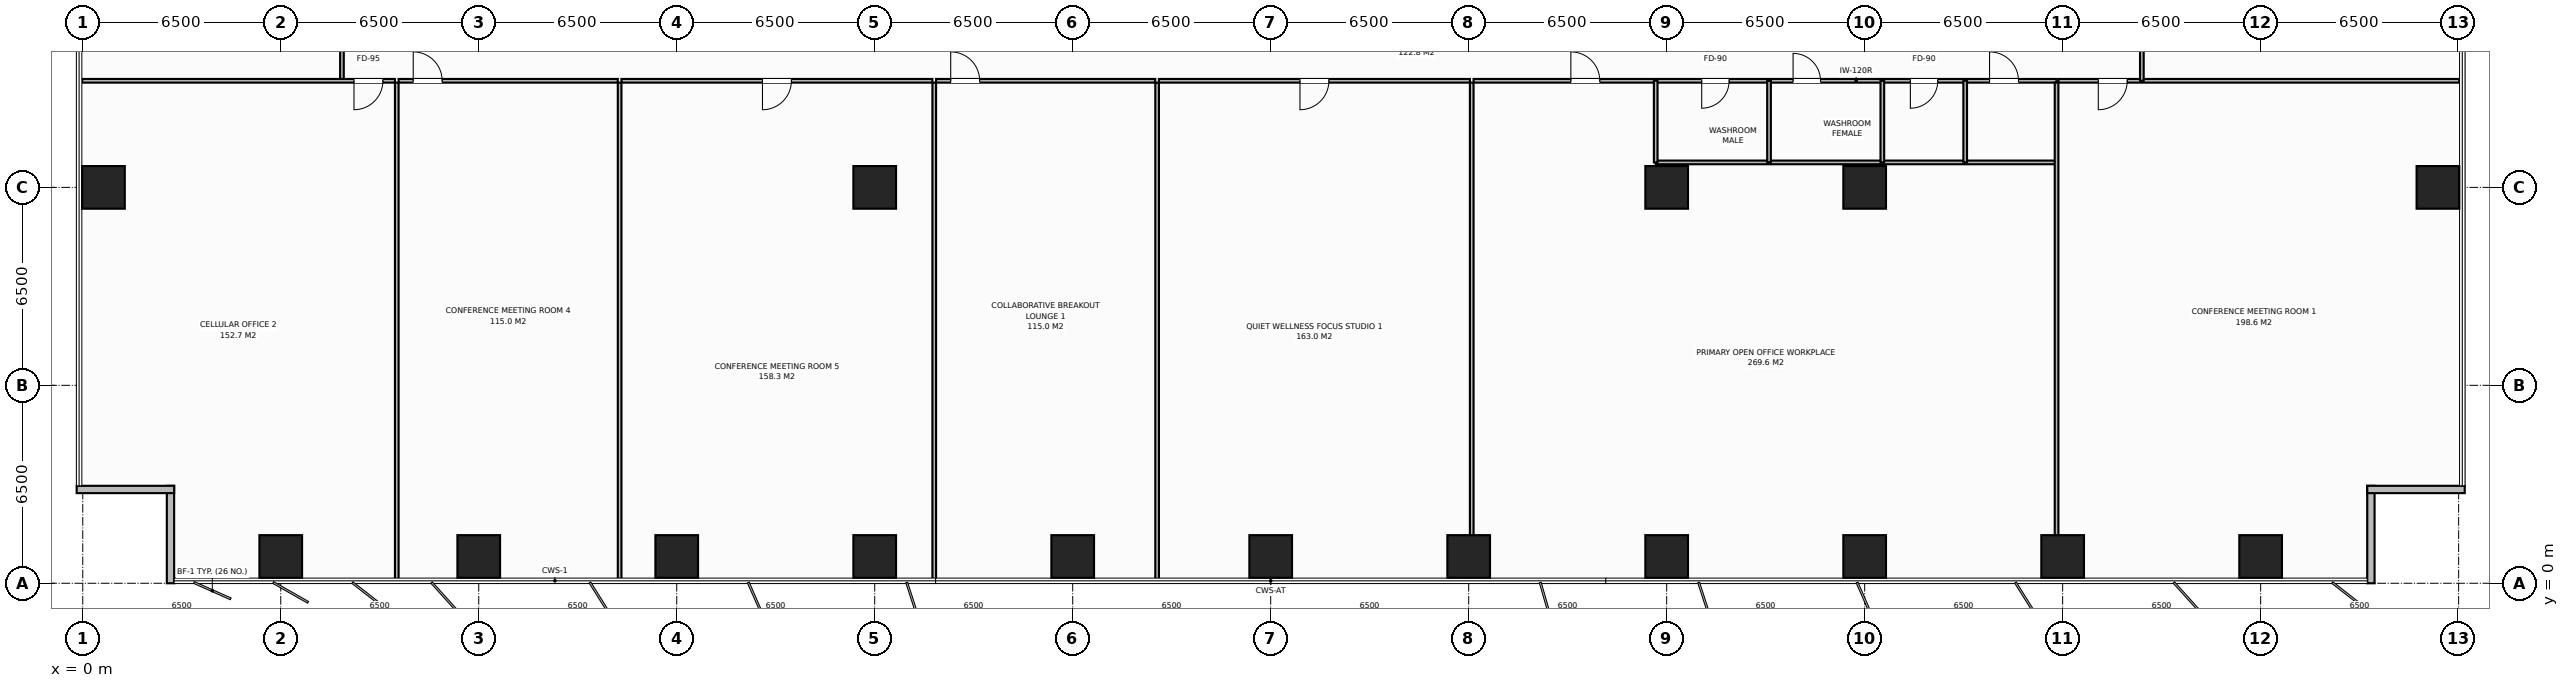
"""IFC4 building model, lengths in metres.
Left out: names, types, materials, properties, quantities, classifications, styles, units other than length and angle.
Written with IfcOpenShell. Run it as: python <this file> out.ifc"""

import sys

from ifc_helpers import new_model, si_unit, direction, frame, frame_2d, origin, origin_2d, place, context, subcontext, project, spatial, rectangle, extrude, element, fill, save


model = new_model("IFC4")
c1 = context("Model", 3, precision=1e-05, world=origin(), true_north=direction((0.0, 1.0)))
c2 = subcontext(c1, "Body", "Model", "MODEL_VIEW")
j1 = project(units=[si_unit("LENGTHUNIT", "METRE"), si_unit("PLANEANGLEUNIT", "RADIAN")], contexts=[c1])
p1 = place(None, origin())
s1 = spatial("IfcSite", under=j1, at=p1, CompositionType="ELEMENT")
p2 = place(p1, origin())
s2 = spatial("IfcBuilding", under=s1, at=p2, CompositionType="ELEMENT")
p3 = place(p2, frame((0.0, 0.0, 62.0)))
s3 = spatial("IfcBuildingStorey", under=s2, at=p3, CompositionType="ELEMENT", Elevation=62.0)
for number, where, z_axis, x_axis in (
    (1, (58.5, 13.0, 0.0), (0.0, 0.0, 1.0), (1.0, 0.0, 0.0)),
    (2, (26.0, 13.0, 0.0), (0.0, 0.0, 1.0), (1.0, 0.0, 0.0)),
    (3, (52.0, 13.0, 0.0), (0.0, 0.0, 1.0), (1.0, 0.0, 0.0)),
    (4, (6.5, 0.88, 0.0), (0.0, 0.0, 1.0), (1.0, 0.0, 0.0)),
    (5, (13.0, 0.88, 0.0), (0.0, 0.0, 1.0), (1.0, 0.0, 0.0)),
    (6, (19.5, 0.88, 0.0), (0.0, 0.0, 1.0), (1.0, 0.0, 0.0)),
    (7, (26.0, 0.88, 0.0), (0.0, 0.0, 1.0), (1.0, 0.0, 0.0)),
    (8, (32.5, 0.88, 0.0), (0.0, 0.0, 1.0), (1.0, 0.0, 0.0)),
    (9, (39.0, 0.88, 0.0), (0.0, 0.0, 1.0), (1.0, 0.0, 0.0)),
    (10, (45.5, 0.88, 0.0), (0.0, 0.0, 1.0), (1.0, 0.0, 0.0)),
    (11, (52.0, 0.88, 0.0), (0.0, 0.0, 1.0), (1.0, 0.0, 0.0)),
    (12, (58.5, 0.88, 0.0), (0.0, 0.0, 1.0), (1.0, 0.0, 0.0)),
    (13, (65.0, 0.88, 0.0), (0.0, 0.0, 1.0), (1.0, 0.0, 0.0)),
    (14, (71.5, 0.88, 0.0), (0.0, 0.0, 1.0), (1.0, 0.0, 0.0)),
    (15, (0.68, 13.0, 0.0), (0.0, 0.0, 1.0), (1.0, 0.0, 0.0)),
    (16, (77.32, 13.0, 0.0), (0.0, 0.0, 1.0), (1.0, 0.0, 0.0)),
):
    element("IfcColumn", number, at=place(p3, frame(where, z_axis=z_axis, x_axis=x_axis)), inside=s3, PredefinedType="COLUMN", context=c2, shape_type="SweptSolid", body=[
        extrude(rectangle(XDim=1.4, YDim=1.4, at=origin_2d()), origin(), (0.0, 0.0, 1.0), 3.8),
    ])
for number, where, z_axis, x_axis in (
    (17, (2.88, 0.0, 0.0), (0.0, 0.0, 1.0), (0.0, 1.0, 0.0)),
    (18, (3.0, 3.08, 0.0), (0.0, 0.0, 1.0), (-1.0, 0.0, 0.0)),
    (19, (75.12, 3.2, 0.0), (0.0, 0.0, 1.0), (0.0, -1.0, 0.0)),
    (20, (78.2, 3.08, 0.0), (0.0, 0.0, 1.0), (-1.0, 0.0, 0.0)),
):
    element("IfcWall", number, at=place(p3, frame(where, z_axis=z_axis, x_axis=x_axis)), inside=s3, PredefinedType="STANDARD", context=c2, shape_type="SweptSolid", body=[
        extrude(rectangle(XDim=3.2, YDim=0.24, at=frame_2d((1.6, 0.0))), origin(), (0.0, 0.0, 1.0), 3.55),
    ])
p4 = place(p3, frame((8.509, 16.5, 0.0), z_axis=(0.0, 0.0, 1.0), x_axis=(0.0, 1.0, 0.0)))
e21 = element("IfcWall", 21, at=p4, inside=s3, PredefinedType="PARTITIONING", context=c2, shape_type="SweptSolid", body=[
    extrude(rectangle(XDim=2.1, YDim=0.12, at=frame_2d((1.05, 0.0))), origin(), (0.0, 0.0, 1.0), 3.55),
])
p5 = place(p3, frame((51.64, 16.5, 0.0), z_axis=(0.0, 0.0, 1.0), x_axis=(1.0, 0.0, 0.0)))
e22 = element("IfcWall", 22, at=p5, inside=s3, PredefinedType="PARTITIONING", context=c2, shape_type="SweptSolid", body=[
    extrude(rectangle(XDim=13.16, YDim=0.12, at=frame_2d((6.58, 0.0))), origin(), (0.0, 0.0, 1.0), 3.55),
])
p6 = place(p5, frame((1.51, 0.0, 0.0)))
e23 = element("IfcOpeningElement", 23, at=p6, cuts=e22, PredefinedType="OPENING", context=c2, shape_type="SweptSolid", body=[
    extrude(rectangle(XDim=0.9, YDim=2.15, at=frame_2d((0.45, 1.075))), frame((0.0, 0.07, 0.0), z_axis=(0.0, -1.0, 0.0), x_axis=(1.0, 0.0, 0.0)), (0.0, 0.0, 1.0), 0.14),
])
p7 = place(p5, frame((4.51, 0.0, 0.0)))
e24 = element("IfcOpeningElement", 24, at=p7, cuts=e22, PredefinedType="OPENING", context=c2, shape_type="SweptSolid", body=[
    extrude(rectangle(XDim=0.9, YDim=2.15, at=frame_2d((0.45, 1.075))), frame((0.0, 0.07, 0.0), z_axis=(0.0, -1.0, 0.0), x_axis=(1.0, 0.0, 0.0)), (0.0, 0.0, 1.0), 0.14),
])
p8 = place(p5, frame((8.36, 0.0, 0.0)))
e25 = element("IfcOpeningElement", 25, at=p8, cuts=e22, PredefinedType="OPENING", context=c2, shape_type="SweptSolid", body=[
    extrude(rectangle(XDim=0.9, YDim=2.15, at=frame_2d((0.45, 1.075))), frame((0.0, 0.07, 0.0), z_axis=(0.0, -1.0, 0.0), x_axis=(1.0, 0.0, 0.0)), (0.0, 0.0, 1.0), 0.14),
])
p9 = place(p5, frame((10.96, 0.0, 0.0)))
e26 = element("IfcOpeningElement", 26, at=p9, cuts=e22, PredefinedType="OPENING", context=c2, shape_type="SweptSolid", body=[
    extrude(rectangle(XDim=0.95, YDim=2.15, at=frame_2d((0.475, 1.075))), frame((0.0, 0.07, 0.0), z_axis=(0.0, -1.0, 0.0), x_axis=(1.0, 0.0, 0.0)), (0.0, 0.0, 1.0), 0.14),
])
p10 = place(p3, frame((51.64, 13.82, 0.0), z_axis=(0.0, 0.0, 1.0), x_axis=(1.0, 0.0, 0.0)))
e27 = element("IfcWall", 27, at=p10, inside=s3, PredefinedType="PARTITIONING", context=c2, shape_type="SweptSolid", body=[
    extrude(rectangle(XDim=13.16, YDim=0.12, at=frame_2d((6.58, 0.0))), origin(), (0.0, 0.0, 1.0), 3.55),
])
for number, where, z_axis, x_axis in (
    (28, (51.64, 13.82, 0.0), (0.0, 0.0, 1.0), (0.0, 1.0, 0.0)),
    (29, (55.36, 13.82, 0.0), (0.0, 0.0, 1.0), (0.0, 1.0, 0.0)),
    (30, (59.08, 13.82, 0.0), (0.0, 0.0, 1.0), (0.0, 1.0, 0.0)),
    (31, (61.8, 13.82, 0.0), (0.0, 0.0, 1.0), (0.0, 1.0, 0.0)),
):
    element("IfcWall", number, at=place(p3, frame(where, z_axis=z_axis, x_axis=x_axis)), inside=s3, PredefinedType="PARTITIONING", context=c2, shape_type="SweptSolid", body=[
        extrude(rectangle(XDim=2.68, YDim=0.12, at=frame_2d((1.34, 0.0))), origin(), (0.0, 0.0, 1.0), 3.55),
    ])
p11 = place(p3, frame((10.309, 0.02, 0.0), z_axis=(0.0, 0.0, 1.0), x_axis=(0.0, 1.0, 0.0)))
e32 = element("IfcWall", 32, at=p11, inside=s3, PredefinedType="PARTITIONING", context=c2, shape_type="SweptSolid", body=[
    extrude(rectangle(XDim=16.42, YDim=0.12, at=frame_2d((8.21, 0.0))), origin(), (0.0, 0.0, 1.0), 3.55),
])
p12 = place(p3, frame((-0.02, 16.5, 0.0), z_axis=(0.0, 0.0, 1.0), x_axis=(1.0, 0.0, 0.0)))
e33 = element("IfcWall", 33, at=p12, inside=s3, PredefinedType="PARTITIONING", context=c2, shape_type="SweptSolid", body=[
    extrude(rectangle(XDim=10.269, YDim=0.12, at=frame_2d((5.135, 0.0))), origin(), (0.0, 0.0, 1.0), 3.55),
])
p13 = place(p12, frame((8.924, 0.0, 0.0)))
e34 = element("IfcOpeningElement", 34, at=p13, cuts=e33, PredefinedType="OPENING", context=c2, shape_type="SweptSolid", body=[
    extrude(rectangle(XDim=0.95, YDim=2.15, at=frame_2d((0.475, 1.075))), frame((0.0, 0.07, 0.0), z_axis=(0.0, -1.0, 0.0), x_axis=(1.0, 0.0, 0.0)), (0.0, 0.0, 1.0), 0.14),
])
p14 = place(p3, frame((17.625, 0.02, 0.0), z_axis=(0.0, 0.0, 1.0), x_axis=(0.0, 1.0, 0.0)))
e35 = element("IfcWall", 35, at=p14, inside=s3, PredefinedType="PARTITIONING", context=c2, shape_type="SweptSolid", body=[
    extrude(rectangle(XDim=16.42, YDim=0.12, at=frame_2d((8.21, 0.0))), origin(), (0.0, 0.0, 1.0), 3.55),
])
p15 = place(p3, frame((10.369, 16.5, 0.0), z_axis=(0.0, 0.0, 1.0), x_axis=(1.0, 0.0, 0.0)))
e36 = element("IfcWall", 36, at=p15, inside=s3, PredefinedType="PARTITIONING", context=c2, shape_type="SweptSolid", body=[
    extrude(rectangle(XDim=7.196, YDim=0.12, at=frame_2d((3.598, 0.0))), origin(), (0.0, 0.0, 1.0), 3.55),
])
p16 = place(p15, frame((0.48, 0.0, 0.0)))
e37 = element("IfcOpeningElement", 37, at=p16, cuts=e36, PredefinedType="OPENING", context=c2, shape_type="SweptSolid", body=[
    extrude(rectangle(XDim=0.95, YDim=2.15, at=frame_2d((0.475, 1.075))), frame((0.0, 0.07, 0.0), z_axis=(0.0, -1.0, 0.0), x_axis=(1.0, 0.0, 0.0)), (0.0, 0.0, 1.0), 0.14),
])
p17 = place(p3, frame((27.955, 0.02, 0.0), z_axis=(0.0, 0.0, 1.0), x_axis=(0.0, 1.0, 0.0)))
e38 = element("IfcWall", 38, at=p17, inside=s3, PredefinedType="PARTITIONING", context=c2, shape_type="SweptSolid", body=[
    extrude(rectangle(XDim=16.42, YDim=0.12, at=frame_2d((8.21, 0.0))), origin(), (0.0, 0.0, 1.0), 3.55),
])
p18 = place(p3, frame((17.686, 16.5, 0.0), z_axis=(0.0, 0.0, 1.0), x_axis=(1.0, 0.0, 0.0)))
e39 = element("IfcWall", 39, at=p18, inside=s3, PredefinedType="PARTITIONING", context=c2, shape_type="SweptSolid", body=[
    extrude(rectangle(XDim=10.209, YDim=0.12, at=frame_2d((5.104, 0.0))), origin(), (0.0, 0.0, 1.0), 3.55),
])
p19 = place(p18, frame((4.629, 0.0, 0.0)))
e40 = element("IfcOpeningElement", 40, at=p19, cuts=e39, PredefinedType="OPENING", context=c2, shape_type="SweptSolid", body=[
    extrude(rectangle(XDim=0.95, YDim=2.15, at=frame_2d((0.475, 1.075))), frame((0.0, 0.07, 0.0), z_axis=(0.0, -1.0, 0.0), x_axis=(1.0, 0.0, 0.0)), (0.0, 0.0, 1.0), 0.14),
])
p20 = place(p3, frame((35.271, 0.02, 0.0), z_axis=(0.0, 0.0, 1.0), x_axis=(0.0, 1.0, 0.0)))
e41 = element("IfcWall", 41, at=p20, inside=s3, PredefinedType="PARTITIONING", context=c2, shape_type="SweptSolid", body=[
    extrude(rectangle(XDim=16.42, YDim=0.12, at=frame_2d((8.21, 0.0))), origin(), (0.0, 0.0, 1.0), 3.55),
])
p21 = place(p3, frame((28.014, 16.5, 0.0), z_axis=(0.0, 0.0, 1.0), x_axis=(1.0, 0.0, 0.0)))
e42 = element("IfcWall", 42, at=p21, inside=s3, PredefinedType="PARTITIONING", context=c2, shape_type="SweptSolid", body=[
    extrude(rectangle(XDim=7.197, YDim=0.12, at=frame_2d((3.598, 0.0))), origin(), (0.0, 0.0, 1.0), 3.55),
])
p22 = place(p21, frame((0.48, 0.0, 0.0)))
e43 = element("IfcOpeningElement", 43, at=p22, cuts=e42, PredefinedType="OPENING", context=c2, shape_type="SweptSolid", body=[
    extrude(rectangle(XDim=0.95, YDim=2.15, at=frame_2d((0.475, 1.075))), frame((0.0, 0.07, 0.0), z_axis=(0.0, -1.0, 0.0), x_axis=(1.0, 0.0, 0.0)), (0.0, 0.0, 1.0), 0.14),
])
p23 = place(p3, frame((45.6, 0.02, 0.0), z_axis=(0.0, 0.0, 1.0), x_axis=(0.0, 1.0, 0.0)))
e44 = element("IfcWall", 44, at=p23, inside=s3, PredefinedType="PARTITIONING", context=c2, shape_type="SweptSolid", body=[
    extrude(rectangle(XDim=16.42, YDim=0.12, at=frame_2d((8.21, 0.0))), origin(), (0.0, 0.0, 1.0), 2.9),
])
p24 = place(p3, frame((35.331, 16.5, 0.0), z_axis=(0.0, 0.0, 1.0), x_axis=(1.0, 0.0, 0.0)))
e45 = element("IfcWall", 45, at=p24, inside=s3, PredefinedType="PARTITIONING", context=c2, shape_type="SweptSolid", body=[
    extrude(rectangle(XDim=10.209, YDim=0.12, at=frame_2d((5.104, 0.0))), origin(), (0.0, 0.0, 1.0), 3.55),
])
p25 = place(p24, frame((4.63, 0.0, 0.0)))
e46 = element("IfcOpeningElement", 46, at=p25, cuts=e45, PredefinedType="OPENING", context=c2, shape_type="SweptSolid", body=[
    extrude(rectangle(XDim=0.95, YDim=2.15, at=frame_2d((0.475, 1.075))), frame((0.0, 0.07, 0.0), z_axis=(0.0, -1.0, 0.0), x_axis=(1.0, 0.0, 0.0)), (0.0, 0.0, 1.0), 0.14),
])
p26 = place(p3, frame((64.8, 0.02, 0.0), z_axis=(0.0, 0.0, 1.0), x_axis=(0.0, 1.0, 0.0)))
e47 = element("IfcWall", 47, at=p26, inside=s3, PredefinedType="PARTITIONING", context=c2, shape_type="SweptSolid", body=[
    extrude(rectangle(XDim=16.42, YDim=0.12, at=frame_2d((8.21, 0.0))), origin(), (0.0, 0.0, 1.0), 2.9),
])
p27 = place(p3, frame((45.66, 16.5, 0.0), z_axis=(0.0, 0.0, 1.0), x_axis=(1.0, 0.0, 0.0)))
e48 = element("IfcWall", 48, at=p27, inside=s3, PredefinedType="PARTITIONING", context=c2, shape_type="SweptSolid", body=[
    extrude(rectangle(XDim=5.92, YDim=0.12, at=frame_2d((2.96, 0.0))), origin(), (0.0, 0.0, 1.0), 3.55),
])
p28 = place(p27, frame((3.194, 0.0, 0.0)))
e49 = element("IfcOpeningElement", 49, at=p28, cuts=e48, PredefinedType="OPENING", context=c2, shape_type="SweptSolid", body=[
    extrude(rectangle(XDim=0.95, YDim=2.15, at=frame_2d((0.475, 1.075))), frame((0.0, 0.07, 0.0), z_axis=(0.0, -1.0, 0.0), x_axis=(1.0, 0.0, 0.0)), (0.0, 0.0, 1.0), 0.14),
])
p29 = place(p3, frame((64.86, 16.5, 0.0), z_axis=(0.0, 0.0, 1.0), x_axis=(1.0, 0.0, 0.0)))
e50 = element("IfcWall", 50, at=p29, inside=s3, PredefinedType="PARTITIONING", context=c2, shape_type="SweptSolid", body=[
    extrude(rectangle(XDim=13.16, YDim=0.12, at=frame_2d((6.58, 0.0))), origin(), (0.0, 0.0, 1.0), 3.55),
])
p30 = place(p29, frame((1.31, 0.0, 0.0)))
e51 = element("IfcOpeningElement", 51, at=p30, cuts=e50, PredefinedType="OPENING", context=c2, shape_type="SweptSolid", body=[
    extrude(rectangle(XDim=0.95, YDim=2.15, at=frame_2d((0.475, 1.075))), frame((0.0, 0.07, 0.0), z_axis=(0.0, -1.0, 0.0), x_axis=(1.0, 0.0, 0.0)), (0.0, 0.0, 1.0), 0.14),
])
p31 = place(p3, frame((67.6, 16.5, 0.0), z_axis=(0.0, 0.0, 1.0), x_axis=(0.0, 1.0, 0.0)))
e52 = element("IfcWall", 52, at=p31, inside=s3, PredefinedType="PARTITIONING", context=c2, shape_type="SweptSolid", body=[
    extrude(rectangle(XDim=9.5, YDim=0.12, at=frame_2d((4.75, 0.0))), origin(), (0.0, 0.0, 1.0), 3.55),
])
p32 = place(p31, frame((5.325, 0.0, 0.0)))
e53 = element("IfcOpeningElement", 53, at=p32, cuts=e52, PredefinedType="OPENING", context=c2, shape_type="SweptSolid", body=[
    extrude(rectangle(XDim=0.95, YDim=2.15, at=frame_2d((0.475, 1.075))), frame((0.0, 0.07, 0.0), z_axis=(0.0, -1.0, 0.0), x_axis=(1.0, 0.0, 0.0)), (0.0, 0.0, 1.0), 0.14),
])
p33 = place(p6, origin())
e54 = element("IfcDoor", 54, at=p33, inside=s3, OperationType="SINGLE_SWING_RIGHT", PredefinedType="DOOR", context=c2, shape_type="SweptSolid", body=[
    extrude(rectangle(XDim=0.9, YDim=2.15, at=frame_2d((0.45, 1.075))), frame((0.0, 0.025, 0.0), z_axis=(0.0, -1.0, 0.0), x_axis=(1.0, 0.0, 0.0)), (0.0, 0.0, 1.0), 0.05),
])
fill(e23, e54)
p34 = place(p7, origin())
e55 = element("IfcDoor", 55, at=p34, inside=s3, OperationType="SINGLE_SWING_LEFT", PredefinedType="DOOR", context=c2, shape_type="SweptSolid", body=[
    extrude(rectangle(XDim=0.9, YDim=2.15, at=frame_2d((0.45, 1.075))), frame((0.0, 0.025, 0.0), z_axis=(0.0, -1.0, 0.0), x_axis=(1.0, 0.0, 0.0)), (0.0, 0.0, 1.0), 0.05),
])
fill(e24, e55)
p35 = place(p8, origin())
e56 = element("IfcDoor", 56, at=p35, inside=s3, OperationType="SINGLE_SWING_RIGHT", PredefinedType="DOOR", context=c2, shape_type="SweptSolid", body=[
    extrude(rectangle(XDim=0.9, YDim=2.15, at=frame_2d((0.45, 1.075))), frame((0.0, 0.025, 0.0), z_axis=(0.0, -1.0, 0.0), x_axis=(1.0, 0.0, 0.0)), (0.0, 0.0, 1.0), 0.05),
])
fill(e25, e56)
p36 = place(p9, origin())
e57 = element("IfcDoor", 57, at=p36, inside=s3, OperationType="SINGLE_SWING_LEFT", PredefinedType="DOOR", context=c2, shape_type="SweptSolid", body=[
    extrude(rectangle(XDim=0.95, YDim=2.15, at=frame_2d((0.475, 1.075))), frame((0.0, 0.025, 0.0), z_axis=(0.0, -1.0, 0.0), x_axis=(1.0, 0.0, 0.0)), (0.0, 0.0, 1.0), 0.05),
])
fill(e26, e57)
p37 = place(p13, origin())
e58 = element("IfcDoor", 58, at=p37, inside=s3, OperationType="SINGLE_SWING_RIGHT", PredefinedType="DOOR", context=c2, shape_type="SweptSolid", body=[
    extrude(rectangle(XDim=0.95, YDim=2.15, at=frame_2d((0.475, 1.075))), frame((0.0, 0.025, 0.0), z_axis=(0.0, -1.0, 0.0), x_axis=(1.0, 0.0, 0.0)), (0.0, 0.0, 1.0), 0.05),
])
fill(e34, e58)
p38 = place(p16, origin())
e59 = element("IfcDoor", 59, at=p38, inside=s3, OperationType="SINGLE_SWING_LEFT", PredefinedType="DOOR", context=c2, shape_type="SweptSolid", body=[
    extrude(rectangle(XDim=0.95, YDim=2.15, at=frame_2d((0.475, 1.075))), frame((0.0, 0.025, 0.0), z_axis=(0.0, -1.0, 0.0), x_axis=(1.0, 0.0, 0.0)), (0.0, 0.0, 1.0), 0.05),
])
fill(e37, e59)
p39 = place(p19, origin())
e60 = element("IfcDoor", 60, at=p39, inside=s3, OperationType="SINGLE_SWING_RIGHT", PredefinedType="DOOR", context=c2, shape_type="SweptSolid", body=[
    extrude(rectangle(XDim=0.95, YDim=2.15, at=frame_2d((0.475, 1.075))), frame((0.0, 0.025, 0.0), z_axis=(0.0, -1.0, 0.0), x_axis=(1.0, 0.0, 0.0)), (0.0, 0.0, 1.0), 0.05),
])
fill(e40, e60)
p40 = place(p22, origin())
e61 = element("IfcDoor", 61, at=p40, inside=s3, OperationType="SINGLE_SWING_LEFT", PredefinedType="DOOR", context=c2, shape_type="SweptSolid", body=[
    extrude(rectangle(XDim=0.95, YDim=2.15, at=frame_2d((0.475, 1.075))), frame((0.0, 0.025, 0.0), z_axis=(0.0, -1.0, 0.0), x_axis=(1.0, 0.0, 0.0)), (0.0, 0.0, 1.0), 0.05),
])
fill(e43, e61)
p41 = place(p25, origin())
e62 = element("IfcDoor", 62, at=p41, inside=s3, OperationType="SINGLE_SWING_RIGHT", PredefinedType="DOOR", context=c2, shape_type="SweptSolid", body=[
    extrude(rectangle(XDim=0.95, YDim=2.15, at=frame_2d((0.475, 1.075))), frame((0.0, 0.025, 0.0), z_axis=(0.0, -1.0, 0.0), x_axis=(1.0, 0.0, 0.0)), (0.0, 0.0, 1.0), 0.05),
])
fill(e46, e62)
p42 = place(p28, origin())
e63 = element("IfcDoor", 63, at=p42, inside=s3, OperationType="SINGLE_SWING_LEFT", PredefinedType="DOOR", context=c2, shape_type="SweptSolid", body=[
    extrude(rectangle(XDim=0.95, YDim=2.15, at=frame_2d((0.475, 1.075))), frame((0.0, 0.025, 0.0), z_axis=(0.0, -1.0, 0.0), x_axis=(1.0, 0.0, 0.0)), (0.0, 0.0, 1.0), 0.05),
])
fill(e49, e63)
p43 = place(p30, origin())
e64 = element("IfcDoor", 64, at=p43, inside=s3, OperationType="SINGLE_SWING_RIGHT", PredefinedType="DOOR", context=c2, shape_type="SweptSolid", body=[
    extrude(rectangle(XDim=0.95, YDim=2.15, at=frame_2d((0.475, 1.075))), frame((0.0, 0.025, 0.0), z_axis=(0.0, -1.0, 0.0), x_axis=(1.0, 0.0, 0.0)), (0.0, 0.0, 1.0), 0.05),
])
fill(e51, e64)
save(model, sys.argv[1])
